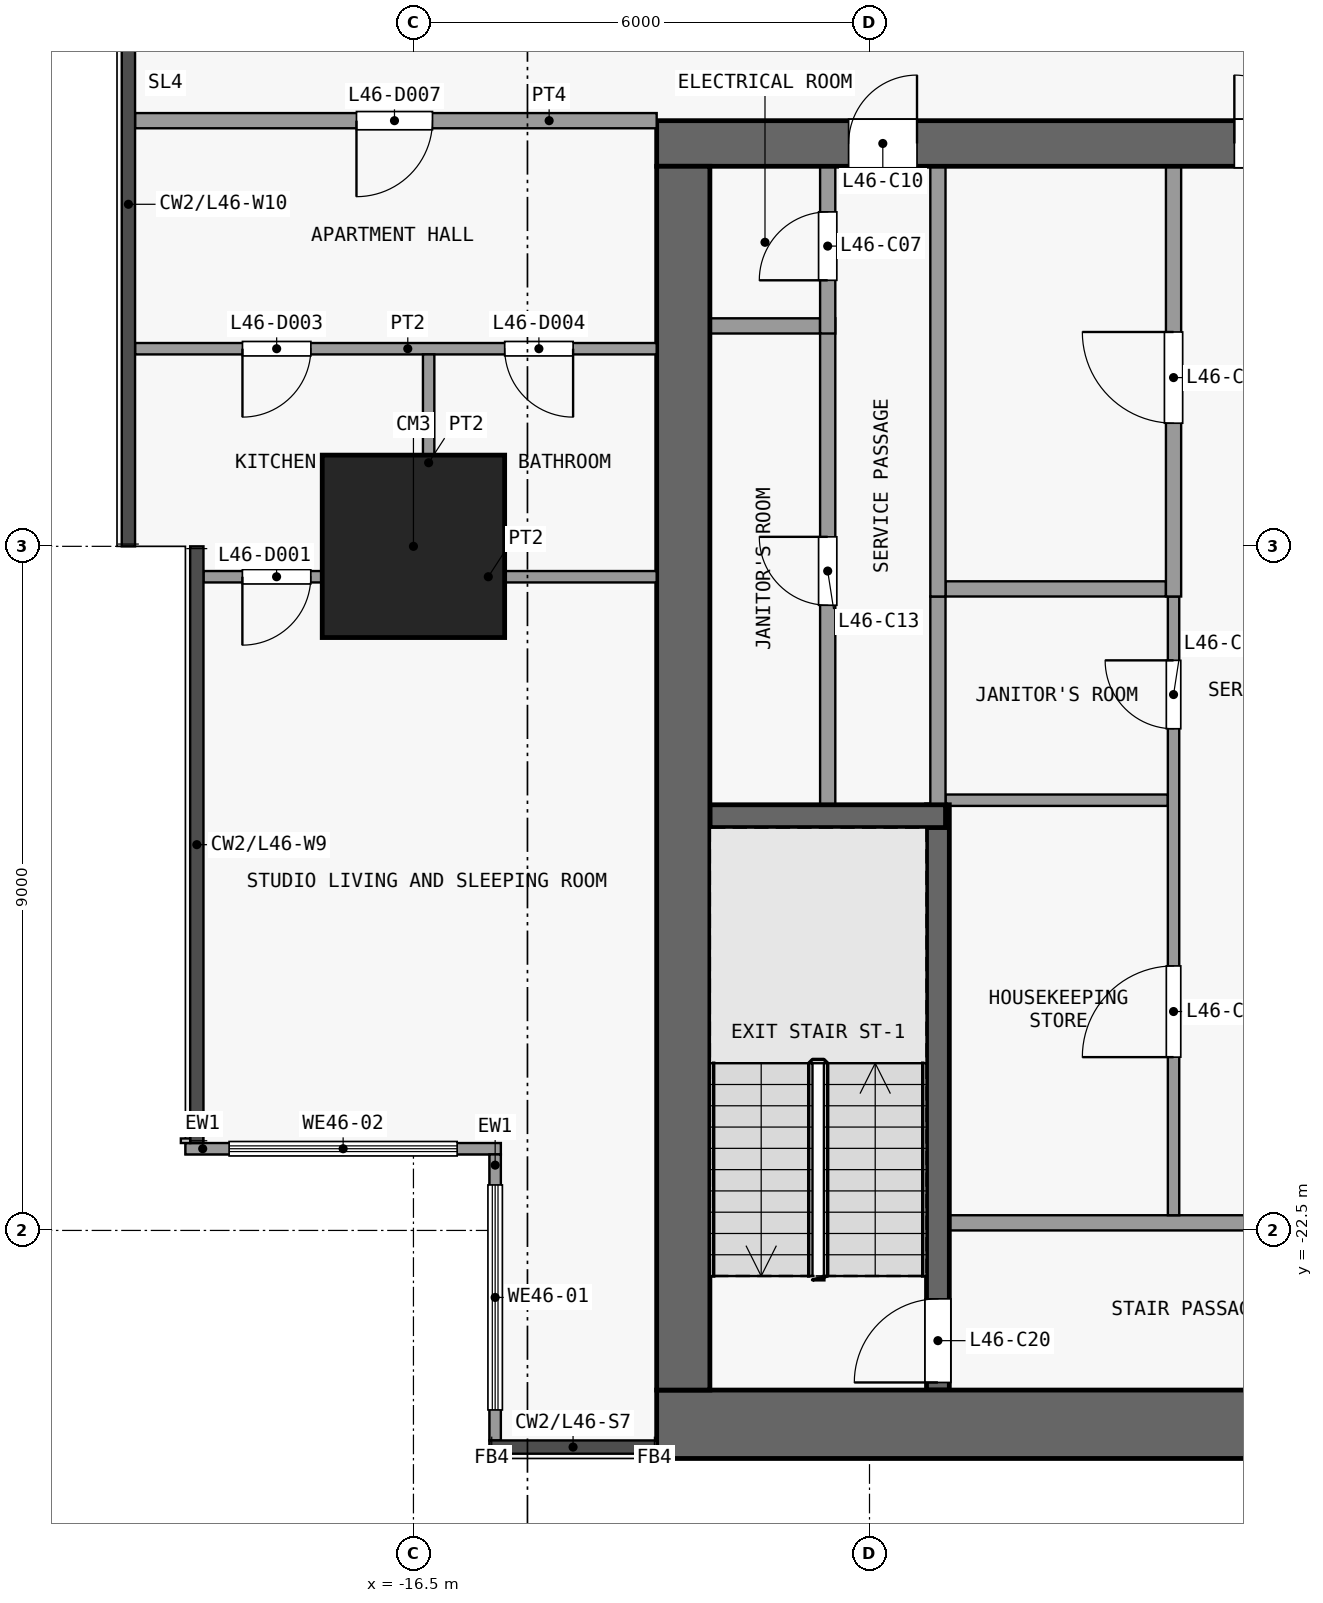
"""IFC4 building model, lengths in metres.
Left out: names, types, materials, properties, quantities, classifications, styles, units other than length and angle.
Written with IfcOpenShell. Run it as: python <this file> out.ifc"""

import sys

from ifc_helpers import new_model, si_unit, direction, frame, frame_2d, origin, origin_2d, place, context, subcontext, project, spatial, rectangle, extrude, element, fill, save


model = new_model("IFC4")
c1 = context("Model", 3, precision=1e-05, world=origin(), true_north=direction((0.0, 1.0)))
c2 = subcontext(c1, "Body", "Model", "MODEL_VIEW")
j1 = project(units=[si_unit("LENGTHUNIT", "METRE"), si_unit("PLANEANGLEUNIT", "RADIAN")], contexts=[c1])
p1 = place(None, origin())
s1 = spatial("IfcSite", under=j1, at=p1, CompositionType="ELEMENT")
p2 = place(p1, origin())
s2 = spatial("IfcBuilding", under=s1, at=p2, CompositionType="ELEMENT")
p3 = place(p2, frame((0.0, 0.0, 185.3)))
s3 = spatial("IfcBuildingStorey", under=s2, at=p3, CompositionType="ELEMENT", Elevation=185.3)
p4 = place(p3, frame((-16.5, -13.5, 0.0), z_axis=(0.0, 0.0, 1.0), x_axis=(1.0, 0.0, 0.0)))
e1 = element("IfcColumn", 1, at=p4, inside=s3, PredefinedType="COLUMN", context=c2, shape_type="SweptSolid", body=[
    extrude(rectangle(XDim=2.4, YDim=2.4, at=origin_2d()), origin(), (0.0, 0.0, 1.0), 3.6),
])
p5 = place(p3, frame((-13.3, -25.05, 0.0), z_axis=(0.0, 0.0, 1.0), x_axis=(1.0, 0.0, 0.0)))
e2 = element("IfcWall", 2, at=p5, inside=s3, PredefinedType="SHEAR", context=c2, shape_type="SweptSolid", body=[
    extrude(rectangle(XDim=26.6, YDim=0.9, at=frame_2d((13.3, 0.0))), origin(), (0.0, 0.0, 1.0), 3.3),
])
p6 = place(p3, frame((-13.3, -8.2, 0.0), z_axis=(0.0, 0.0, 1.0), x_axis=(1.0, 0.0, 0.0)))
e3 = element("IfcWall", 3, at=p6, inside=s3, PredefinedType="SHEAR", context=c2, shape_type="SweptSolid", body=[
    extrude(rectangle(XDim=26.6, YDim=0.6, at=frame_2d((13.3, 0.0))), origin(), (0.0, 0.0, 1.0), 3.3),
])
p7 = place(p6, frame((7.6, 0.0, 0.0)))
e4 = element("IfcOpeningElement", 4, at=p7, cuts=e3, PredefinedType="OPENING", context=c2, shape_type="SweptSolid", body=[
    extrude(rectangle(XDim=1.8, YDim=2.1, at=frame_2d((0.9, 1.05))), frame((0.0, 0.31, 0.0), z_axis=(0.0, -1.0, 0.0), x_axis=(1.0, 0.0, 0.0)), (0.0, 0.0, 1.0), 0.62),
])
p8 = place(p6, frame((17.2, 0.0, 0.0)))
e5 = element("IfcOpeningElement", 5, at=p8, cuts=e3, PredefinedType="OPENING", context=c2, shape_type="SweptSolid", body=[
    extrude(rectangle(XDim=1.8, YDim=2.1, at=frame_2d((0.9, 1.05))), frame((0.0, 0.31, 0.0), z_axis=(0.0, -1.0, 0.0), x_axis=(1.0, 0.0, 0.0)), (0.0, 0.0, 1.0), 0.62),
])
p9 = place(p6, frame((2.525, 0.0, 0.0)))
e6 = element("IfcOpeningElement", 6, at=p9, cuts=e3, PredefinedType="OPENING", context=c2, shape_type="SweptSolid", body=[
    extrude(rectangle(XDim=0.9, YDim=2.1, at=frame_2d((0.45, 1.05))), frame((0.0, 0.31, 0.0), z_axis=(0.0, -1.0, 0.0), x_axis=(1.0, 0.0, 0.0)), (0.0, 0.0, 1.0), 0.62),
])
p10 = place(p6, frame((23.175, 0.0, 0.0)))
e7 = element("IfcOpeningElement", 7, at=p10, cuts=e3, PredefinedType="OPENING", context=c2, shape_type="SweptSolid", body=[
    extrude(rectangle(XDim=0.9, YDim=2.1, at=frame_2d((0.45, 1.05))), frame((0.0, 0.31, 0.0), z_axis=(0.0, -1.0, 0.0), x_axis=(1.0, 0.0, 0.0)), (0.0, 0.0, 1.0), 0.62),
])
p11 = place(p3, frame((-12.95, -24.6, 0.0), z_axis=(0.0, 0.0, 1.0), x_axis=(0.0, 1.0, 0.0)))
e8 = element("IfcWall", 8, at=p11, inside=s3, PredefinedType="SHEAR", context=c2, shape_type="SweptSolid", body=[
    extrude(rectangle(XDim=16.1, YDim=0.7, at=frame_2d((8.05, 0.0))), origin(), (0.0, 0.0, 1.0), 3.3),
])
p12 = place(p3, frame((-3.25, -22.4, 0.0), z_axis=(0.0, 0.0, 1.0), x_axis=(-1.0, 0.0, 0.0)))
e9 = element("IfcWall", 9, at=p12, inside=s3, PredefinedType="PARTITIONING", context=c2, shape_type="SweptSolid", body=[
    extrude(rectangle(XDim=6.2, YDim=0.2, at=frame_2d((3.1, 0.0))), origin(), (0.0, 0.0, 1.0), 3.3),
])
p13 = place(p12, frame((0.8, 0.0, 0.0)))
e10 = element("IfcOpeningElement", 10, at=p13, cuts=e9, PredefinedType="OPENING", context=c2, shape_type="SweptSolid", body=[
    extrude(rectangle(XDim=1.5, YDim=2.1, at=frame_2d((0.75, 1.05))), frame((0.0, 0.11, 0.0), z_axis=(0.0, -1.0, 0.0), x_axis=(1.0, 0.0, 0.0)), (0.0, 0.0, 1.0), 0.22),
])
p14 = place(p3, frame((-12.6, -17.05, 0.0), z_axis=(0.0, 0.0, 1.0), x_axis=(1.0, 0.0, 0.0)))
e11 = element("IfcWall", 11, at=p14, inside=s3, PredefinedType="SHEAR", context=c2, shape_type="SweptSolid", body=[
    extrude(rectangle(XDim=3.1, YDim=0.3, at=frame_2d((1.55, 0.0))), origin(), (0.0, 0.0, 1.0), 3.3),
])
p15 = place(p3, frame((-9.5, -16.84, 0.0), z_axis=(0.0, 0.0, 1.0), x_axis=(1.0, 0.0, 0.0)))
e12 = element("IfcWall", 12, at=p15, inside=s3, PredefinedType="PARTITIONING", context=c2, shape_type="SweptSolid", body=[
    extrude(rectangle(XDim=2.925, YDim=0.15, at=frame_2d((1.462, 0.0))), origin(), (0.0, 0.0, 1.0), 3.3),
])
p16 = place(p3, frame((-9.5, -14.06, 0.0), z_axis=(0.0, 0.0, 1.0), x_axis=(1.0, 0.0, 0.0)))
e13 = element("IfcWall", 13, at=p16, inside=s3, PredefinedType="PARTITIONING", context=c2, shape_type="SweptSolid", body=[
    extrude(rectangle(XDim=2.9, YDim=0.2, at=frame_2d((1.45, 0.0))), origin(), (0.0, 0.0, 1.0), 3.3),
])
p17 = place(p3, frame((-12.6, -10.6, 0.0), z_axis=(0.0, 0.0, 1.0), x_axis=(1.0, 0.0, 0.0)))
e14 = element("IfcWall", 14, at=p17, inside=s3, PredefinedType="PARTITIONING", context=c2, shape_type="SweptSolid", body=[
    extrude(rectangle(XDim=1.45, YDim=0.2, at=frame_2d((0.725, 0.0))), origin(), (0.0, 0.0, 1.0), 3.3),
])
p18 = place(p3, frame((-11.05, -16.9, 0.0), z_axis=(0.0, 0.0, 1.0), x_axis=(0.0, 1.0, 0.0)))
e15 = element("IfcWall", 15, at=p18, inside=s3, PredefinedType="PARTITIONING", context=c2, shape_type="SweptSolid", body=[
    extrude(rectangle(XDim=6.4, YDim=0.2, at=frame_2d((3.2, 0.0))), origin(), (0.0, 0.0, 1.0), 3.3),
])
p19 = place(p18, frame((2.625, 0.0, 0.0)))
e16 = element("IfcOpeningElement", 16, at=p19, cuts=e15, PredefinedType="OPENING", context=c2, shape_type="SweptSolid", body=[
    extrude(rectangle(XDim=0.9, YDim=2.1, at=frame_2d((0.45, 1.05))), frame((0.0, 0.11, 0.0), z_axis=(0.0, -1.0, 0.0), x_axis=(1.0, 0.0, 0.0)), (0.0, 0.0, 1.0), 0.22),
])
p20 = place(p3, frame((-11.05, -10.7, 0.0), z_axis=(0.0, 0.0, 1.0), x_axis=(0.0, 1.0, 0.0)))
e17 = element("IfcWall", 17, at=p20, inside=s3, PredefinedType="PARTITIONING", context=c2, shape_type="SweptSolid", body=[
    extrude(rectangle(XDim=2.2, YDim=0.2, at=frame_2d((1.1, 0.0))), origin(), (0.0, 0.0, 1.0), 3.3),
])
p21 = place(p20, frame((0.7, 0.0, 0.0)))
e18 = element("IfcOpeningElement", 18, at=p21, cuts=e17, PredefinedType="OPENING", context=c2, shape_type="SweptSolid", body=[
    extrude(rectangle(XDim=0.9, YDim=2.1, at=frame_2d((0.45, 1.05))), frame((0.0, 0.11, 0.0), z_axis=(0.0, -1.0, 0.0), x_axis=(1.0, 0.0, 0.0)), (0.0, 0.0, 1.0), 0.22),
])
p22 = place(p3, frame((-9.6, -24.6, 0.0), z_axis=(0.0, 0.0, 1.0), x_axis=(0.0, 1.0, 0.0)))
e19 = element("IfcWall", 19, at=p22, inside=s3, PredefinedType="SHEAR", context=c2, shape_type="SweptSolid", body=[
    extrude(rectangle(XDim=7.7, YDim=0.3, at=frame_2d((3.85, 0.0))), origin(), (0.0, 0.0, 1.0), 3.3),
])
p23 = place(p22, frame((0.1, 0.0, 0.0)))
e20 = element("IfcOpeningElement", 20, at=p23, cuts=e19, PredefinedType="OPENING", context=c2, shape_type="SweptSolid", body=[
    extrude(rectangle(XDim=1.1, YDim=2.1, at=frame_2d((0.55, 1.05))), frame((0.0, 0.16, 0.0), z_axis=(0.0, -1.0, 0.0), x_axis=(1.0, 0.0, 0.0)), (0.0, 0.0, 1.0), 0.32),
])
p24 = place(p3, frame((-9.6, -16.9, 0.0), z_axis=(0.0, 0.0, 1.0), x_axis=(0.0, 1.0, 0.0)))
e21 = element("IfcWall", 21, at=p24, inside=s3, PredefinedType="PARTITIONING", context=c2, shape_type="SweptSolid", body=[
    extrude(rectangle(XDim=2.74, YDim=0.2, at=frame_2d((1.37, 0.0))), origin(), (0.0, 0.0, 1.0), 3.3),
])
p25 = place(p3, frame((-9.6, -14.16, 0.0), z_axis=(0.0, 0.0, 1.0), x_axis=(0.0, 1.0, 0.0)))
e22 = element("IfcWall", 22, at=p25, inside=s3, PredefinedType="PARTITIONING", context=c2, shape_type="SweptSolid", body=[
    extrude(rectangle(XDim=5.66, YDim=0.2, at=frame_2d((2.83, 0.0))), origin(), (0.0, 0.0, 1.0), 3.3),
])
p26 = place(p3, frame((-6.5, -22.3, 0.0), z_axis=(0.0, 0.0, 1.0), x_axis=(0.0, 1.0, 0.0)))
e23 = element("IfcWall", 23, at=p26, inside=s3, PredefinedType="PARTITIONING", context=c2, shape_type="SweptSolid", body=[
    extrude(rectangle(XDim=8.14, YDim=0.15, at=frame_2d((4.07, 0.0))), origin(), (0.0, 0.0, 1.0), 3.3),
])
p27 = place(p26, frame((2.08, 0.0, 0.0)))
e24 = element("IfcOpeningElement", 24, at=p27, cuts=e23, PredefinedType="OPENING", context=c2, shape_type="SweptSolid", body=[
    extrude(rectangle(XDim=1.2, YDim=2.1, at=frame_2d((0.6, 1.05))), frame((0.0, 0.085, 0.0), z_axis=(0.0, -1.0, 0.0), x_axis=(1.0, 0.0, 0.0)), (0.0, 0.0, 1.0), 0.17),
])
p28 = place(p26, frame((6.4, 0.0, 0.0)))
e25 = element("IfcOpeningElement", 25, at=p28, cuts=e23, PredefinedType="OPENING", context=c2, shape_type="SweptSolid", body=[
    extrude(rectangle(XDim=0.9, YDim=2.1, at=frame_2d((0.45, 1.05))), frame((0.0, 0.085, 0.0), z_axis=(0.0, -1.0, 0.0), x_axis=(1.0, 0.0, 0.0)), (0.0, 0.0, 1.0), 0.17),
])
p29 = place(p3, frame((-6.5, -14.16, 0.0), z_axis=(0.0, 0.0, 1.0), x_axis=(0.0, 1.0, 0.0)))
e26 = element("IfcWall", 26, at=p29, inside=s3, PredefinedType="PARTITIONING", context=c2, shape_type="SweptSolid", body=[
    extrude(rectangle(XDim=5.66, YDim=0.2, at=frame_2d((2.83, 0.0))), origin(), (0.0, 0.0, 1.0), 3.3),
])
p30 = place(p29, frame((2.28, 0.0, 0.0)))
e27 = element("IfcOpeningElement", 27, at=p30, cuts=e26, PredefinedType="OPENING", context=c2, shape_type="SweptSolid", body=[
    extrude(rectangle(XDim=1.2, YDim=2.1, at=frame_2d((0.6, 1.05))), frame((0.0, 0.11, 0.0), z_axis=(0.0, -1.0, 0.0), x_axis=(1.0, 0.0, 0.0)), (0.0, 0.0, 1.0), 0.22),
])
p31 = place(p3, frame((-15.425, -25.262, 0.0), z_axis=(0.0, 0.0, 1.0), x_axis=(0.0, 1.0, 0.0)))
e28 = element("IfcWall", 28, at=p31, inside=s3, PredefinedType="SOLIDWALL", context=c2, shape_type="SweptSolid", body=[
    extrude(rectangle(XDim=3.762, YDim=0.15, at=frame_2d((1.881, 0.0))), origin(), (0.0, 0.0, 1.0), 3.3),
])
p32 = place(p31, frame((0.401, 0.0, 0.9)))
e29 = element("IfcOpeningElement", 29, at=p32, cuts=e28, PredefinedType="OPENING", context=c2, shape_type="SweptSolid", body=[
    extrude(rectangle(XDim=2.96, YDim=2.4, at=frame_2d((1.48, 1.2))), frame((0.0, 0.085, 0.0), z_axis=(0.0, -1.0, 0.0), x_axis=(1.0, 0.0, 0.0)), (0.0, 0.0, 1.0), 0.17),
])
p33 = place(p3, frame((-15.35, -21.425, 0.0), z_axis=(0.0, 0.0, 1.0), x_axis=(-1.0, 0.0, 0.0)))
e30 = element("IfcWall", 30, at=p33, inside=s3, PredefinedType="SOLIDWALL", context=c2, shape_type="SweptSolid", body=[
    extrude(rectangle(XDim=4.15, YDim=0.15, at=frame_2d((2.075, 0.0))), origin(), (0.0, 0.0, 1.0), 3.3),
])
p34 = place(p33, frame((0.575, 0.0, 0.9)))
e31 = element("IfcOpeningElement", 31, at=p34, cuts=e30, PredefinedType="OPENING", context=c2, shape_type="SweptSolid", body=[
    extrude(rectangle(XDim=3.0, YDim=2.4, at=frame_2d((1.5, 1.2))), frame((0.0, 0.085, 0.0), z_axis=(0.0, -1.0, 0.0), x_axis=(1.0, 0.0, 0.0)), (0.0, 0.0, 1.0), 0.17),
])
p35 = place(p3, frame((-19.262, -13.9, 0.0), z_axis=(0.0, 0.0, 1.0), x_axis=(1.0, 0.0, 0.0)))
e32 = element("IfcWall", 32, at=p35, inside=s3, PredefinedType="PARTITIONING", context=c2, shape_type="SweptSolid", body=[
    extrude(rectangle(XDim=5.962, YDim=0.15, at=frame_2d((2.981, 0.0))), origin(), (0.0, 0.0, 1.0), 3.3),
])
p36 = place(p35, frame((0.512, 0.0, 0.0)))
e33 = element("IfcOpeningElement", 33, at=p36, cuts=e32, PredefinedType="OPENING", context=c2, shape_type="SweptSolid", body=[
    extrude(rectangle(XDim=0.9, YDim=2.1, at=frame_2d((0.45, 1.05))), frame((0.0, 0.085, 0.0), z_axis=(0.0, -1.0, 0.0), x_axis=(1.0, 0.0, 0.0)), (0.0, 0.0, 1.0), 0.17),
])
p37 = place(p3, frame((-20.163, -10.9, 0.0), z_axis=(0.0, 0.0, 1.0), x_axis=(1.0, 0.0, 0.0)))
e34 = element("IfcWall", 34, at=p37, inside=s3, PredefinedType="PARTITIONING", context=c2, shape_type="SweptSolid", body=[
    extrude(rectangle(XDim=6.863, YDim=0.15, at=frame_2d((3.431, 0.0))), origin(), (0.0, 0.0, 1.0), 3.3),
])
p38 = place(p37, frame((1.413, 0.0, 0.0)))
e35 = element("IfcOpeningElement", 35, at=p38, cuts=e34, PredefinedType="OPENING", context=c2, shape_type="SweptSolid", body=[
    extrude(rectangle(XDim=0.9, YDim=2.1, at=frame_2d((0.45, 1.05))), frame((0.0, 0.085, 0.0), z_axis=(0.0, -1.0, 0.0), x_axis=(1.0, 0.0, 0.0)), (0.0, 0.0, 1.0), 0.17),
])
p39 = place(p37, frame((4.863, 0.0, 0.0)))
e36 = element("IfcOpeningElement", 36, at=p39, cuts=e34, PredefinedType="OPENING", context=c2, shape_type="SweptSolid", body=[
    extrude(rectangle(XDim=0.9, YDim=2.1, at=frame_2d((0.45, 1.05))), frame((0.0, 0.085, 0.0), z_axis=(0.0, -1.0, 0.0), x_axis=(1.0, 0.0, 0.0)), (0.0, 0.0, 1.0), 0.17),
])
p40 = place(p3, frame((-20.163, -7.9, 0.0), z_axis=(0.0, 0.0, 1.0), x_axis=(1.0, 0.0, 0.0)))
e37 = element("IfcWall", 37, at=p40, inside=s3, PredefinedType="PARTITIONING", context=c2, shape_type="SweptSolid", body=[
    extrude(rectangle(XDim=6.863, YDim=0.2, at=frame_2d((3.431, 0.0))), origin(), (0.0, 0.0, 1.0), 3.3),
])
p41 = place(p40, frame((2.913, 0.0, 0.0)))
e38 = element("IfcOpeningElement", 38, at=p41, cuts=e37, PredefinedType="OPENING", context=c2, shape_type="SweptSolid", body=[
    extrude(rectangle(XDim=1.0, YDim=2.1, at=frame_2d((0.5, 1.05))), frame((0.0, 0.11, 0.0), z_axis=(0.0, -1.0, 0.0), x_axis=(1.0, 0.0, 0.0)), (0.0, 0.0, 1.0), 0.22),
])
p42 = place(p3, frame((-16.3, -13.825, 0.0), z_axis=(0.0, 0.0, 1.0), x_axis=(0.0, 1.0, 0.0)))
e39 = element("IfcWall", 39, at=p42, inside=s3, PredefinedType="PARTITIONING", context=c2, shape_type="SweptSolid", body=[
    extrude(rectangle(XDim=2.85, YDim=0.15, at=frame_2d((1.425, 0.0))), origin(), (0.0, 0.0, 1.0), 3.3),
])
p43 = place(p7, origin())
e40 = element("IfcDoor", 40, at=p43, inside=s3, OperationType="DOUBLE_DOOR_SINGLE_SWING", PredefinedType="DOOR", context=c2, shape_type="SweptSolid", body=[
    extrude(rectangle(XDim=1.8, YDim=2.1, at=frame_2d((0.9, 1.05))), frame((0.0, 0.025, 0.0), z_axis=(0.0, -1.0, 0.0), x_axis=(1.0, 0.0, 0.0)), (0.0, 0.0, 1.0), 0.05),
])
fill(e4, e40)
p44 = place(p21, origin())
e41 = element("IfcDoor", 41, at=p44, inside=s3, OperationType="SINGLE_SWING_LEFT", PredefinedType="DOOR", context=c2, shape_type="SweptSolid", body=[
    extrude(rectangle(XDim=0.9, YDim=2.1, at=frame_2d((0.45, 1.05))), frame((0.0, 0.025, 0.0), z_axis=(0.0, -1.0, 0.0), x_axis=(1.0, 0.0, 0.0)), (0.0, 0.0, 1.0), 0.05),
])
fill(e18, e41)
p45 = place(p30, origin())
e42 = element("IfcDoor", 42, at=p45, inside=s3, OperationType="SINGLE_SWING_RIGHT", PredefinedType="DOOR", context=c2, shape_type="SweptSolid", body=[
    extrude(rectangle(XDim=1.2, YDim=2.1, at=frame_2d((0.6, 1.05))), frame((0.0, 0.025, 0.0), z_axis=(0.0, -1.0, 0.0), x_axis=(1.0, 0.0, 0.0)), (0.0, 0.0, 1.0), 0.05),
])
fill(e27, e42)
p46 = place(p9, origin())
e43 = element("IfcDoor", 43, at=p46, inside=s3, OperationType="SINGLE_SWING_RIGHT", PredefinedType="DOOR", context=c2, shape_type="SweptSolid", body=[
    extrude(rectangle(XDim=0.9, YDim=2.1, at=frame_2d((0.45, 1.05))), frame((0.0, 0.025, 0.0), z_axis=(0.0, -1.0, 0.0), x_axis=(1.0, 0.0, 0.0)), (0.0, 0.0, 1.0), 0.05),
])
fill(e6, e43)
p47 = place(p19, origin())
e44 = element("IfcDoor", 44, at=p47, inside=s3, OperationType="SINGLE_SWING_RIGHT", PredefinedType="DOOR", context=c2, shape_type="SweptSolid", body=[
    extrude(rectangle(XDim=0.9, YDim=2.1, at=frame_2d((0.45, 1.05))), frame((0.0, 0.025, 0.0), z_axis=(0.0, -1.0, 0.0), x_axis=(1.0, 0.0, 0.0)), (0.0, 0.0, 1.0), 0.05),
])
fill(e16, e44)
p48 = place(p27, origin())
e45 = element("IfcDoor", 45, at=p48, inside=s3, OperationType="SINGLE_SWING_LEFT", PredefinedType="DOOR", context=c2, shape_type="SweptSolid", body=[
    extrude(rectangle(XDim=1.2, YDim=2.1, at=frame_2d((0.6, 1.05))), frame((0.0, 0.025, 0.0), z_axis=(0.0, -1.0, 0.0), x_axis=(1.0, 0.0, 0.0)), (0.0, 0.0, 1.0), 0.05),
])
fill(e24, e45)
p49 = place(p28, origin())
e46 = element("IfcDoor", 46, at=p49, inside=s3, OperationType="SINGLE_SWING_RIGHT", PredefinedType="DOOR", context=c2, shape_type="SweptSolid", body=[
    extrude(rectangle(XDim=0.9, YDim=2.1, at=frame_2d((0.45, 1.05))), frame((0.0, 0.025, 0.0), z_axis=(0.0, -1.0, 0.0), x_axis=(1.0, 0.0, 0.0)), (0.0, 0.0, 1.0), 0.05),
])
fill(e25, e46)
p50 = place(p23, origin())
e47 = element("IfcDoor", 47, at=p50, inside=s3, OperationType="SINGLE_SWING_LEFT", PredefinedType="DOOR", context=c2, shape_type="SweptSolid", body=[
    extrude(rectangle(XDim=1.1, YDim=2.1, at=frame_2d((0.55, 1.05))), frame((0.0, 0.025, 0.0), z_axis=(0.0, -1.0, 0.0), x_axis=(1.0, 0.0, 0.0)), (0.0, 0.0, 1.0), 0.05),
])
fill(e20, e47)
p51 = place(p32, origin())
e48 = element("IfcWindow", 48, at=p51, inside=s3, PartitioningType="SINGLE_PANEL", PredefinedType="WINDOW", context=c2, shape_type="SweptSolid", body=[
    extrude(rectangle(XDim=2.96, YDim=2.4, at=frame_2d((1.48, 1.2))), frame((0.0, 0.03, 0.0), z_axis=(0.0, -1.0, 0.0), x_axis=(1.0, 0.0, 0.0)), (0.0, 0.0, 1.0), 0.06),
])
fill(e29, e48)
p52 = place(p34, origin())
e49 = element("IfcWindow", 49, at=p52, inside=s3, PartitioningType="SINGLE_PANEL", PredefinedType="WINDOW", context=c2, shape_type="SweptSolid", body=[
    extrude(rectangle(XDim=3.0, YDim=2.4, at=frame_2d((1.5, 1.2))), frame((0.0, 0.03, 0.0), z_axis=(0.0, -1.0, 0.0), x_axis=(1.0, 0.0, 0.0)), (0.0, 0.0, 1.0), 0.06),
])
fill(e31, e49)
p53 = place(p36, origin())
e50 = element("IfcDoor", 50, at=p53, inside=s3, OperationType="SINGLE_SWING_LEFT", PredefinedType="DOOR", context=c2, shape_type="SweptSolid", body=[
    extrude(rectangle(XDim=0.9, YDim=2.1, at=frame_2d((0.45, 1.05))), frame((0.0, 0.025, 0.0), z_axis=(0.0, -1.0, 0.0), x_axis=(1.0, 0.0, 0.0)), (0.0, 0.0, 1.0), 0.05),
])
fill(e33, e50)
p54 = place(p38, origin())
e51 = element("IfcDoor", 51, at=p54, inside=s3, OperationType="SINGLE_SWING_LEFT", PredefinedType="DOOR", context=c2, shape_type="SweptSolid", body=[
    extrude(rectangle(XDim=0.9, YDim=2.1, at=frame_2d((0.45, 1.05))), frame((0.0, 0.025, 0.0), z_axis=(0.0, -1.0, 0.0), x_axis=(1.0, 0.0, 0.0)), (0.0, 0.0, 1.0), 0.05),
])
fill(e35, e51)
p55 = place(p39, origin())
e52 = element("IfcDoor", 52, at=p55, inside=s3, OperationType="SINGLE_SWING_RIGHT", PredefinedType="DOOR", context=c2, shape_type="SweptSolid", body=[
    extrude(rectangle(XDim=0.9, YDim=2.1, at=frame_2d((0.45, 1.05))), frame((0.0, 0.025, 0.0), z_axis=(0.0, -1.0, 0.0), x_axis=(1.0, 0.0, 0.0)), (0.0, 0.0, 1.0), 0.05),
])
fill(e36, e52)
p56 = place(p41, origin())
e53 = element("IfcDoor", 53, at=p56, inside=s3, OperationType="SINGLE_SWING_LEFT", PredefinedType="DOOR", context=c2, shape_type="SweptSolid", body=[
    extrude(rectangle(XDim=1.0, YDim=2.1, at=frame_2d((0.5, 1.05))), frame((0.0, 0.025, 0.0), z_axis=(0.0, -1.0, 0.0), x_axis=(1.0, 0.0, 0.0)), (0.0, 0.0, 1.0), 0.05),
])
fill(e38, e53)
save(model, sys.argv[1])
